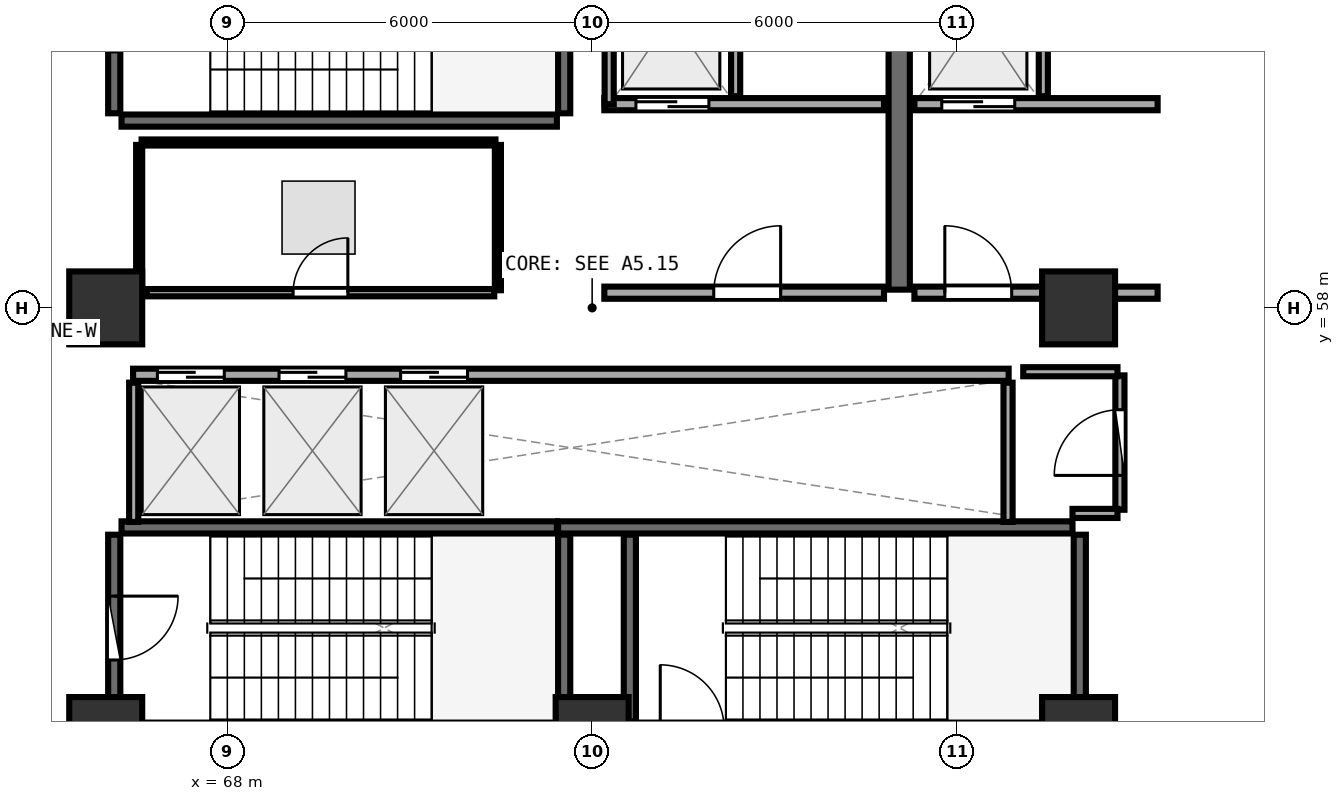
"""IFC4 building model, lengths in metres.
Left out: names, types, materials, properties, quantities, classifications, styles, units other than length and angle.
Written with IfcOpenShell. Run it as: python <this file> out.ifc"""

import sys

from ifc_helpers import new_model, si_unit, direction, frame, frame_2d, origin, origin_2d, place, context, subcontext, project, spatial, rectangle, extrude, element, fill, save


model = new_model("IFC4")
c1 = context("Model", 3, precision=1e-05, world=origin(), true_north=direction((0.0, 1.0)))
c2 = subcontext(c1, "Body", "Model", "MODEL_VIEW")
j1 = project(units=[si_unit("LENGTHUNIT", "METRE"), si_unit("PLANEANGLEUNIT", "RADIAN")], contexts=[c1])
p1 = place(None, origin())
s1 = spatial("IfcSite", under=j1, at=p1, CompositionType="ELEMENT")
p2 = place(p1, origin())
s2 = spatial("IfcBuilding", under=s1, at=p2, CompositionType="ELEMENT")
p3 = place(p2, frame((0.0, 0.0, 184.35)))
s3 = spatial("IfcBuildingStorey", under=s2, at=p3, CompositionType="ELEMENT", Elevation=184.35)
for number, where, z_axis, x_axis in (
    (1, (66.0, 51.0, 0.0), (0.0, 0.0, 1.0), (1.0, 0.0, 0.0)),
    (2, (74.0, 51.0, 0.0), (0.0, 0.0, 1.0), (1.0, 0.0, 0.0)),
    (3, (82.0, 51.0, 0.0), (0.0, 0.0, 1.0), (1.0, 0.0, 0.0)),
    (4, (82.0, 58.0, 0.0), (0.0, 0.0, 1.0), (1.0, 0.0, 0.0)),
    (5, (66.0, 58.0, 0.0), (0.0, 0.0, 1.0), (1.0, 0.0, 0.0)),
):
    element("IfcColumn", number, at=place(p3, frame(where, z_axis=z_axis, x_axis=x_axis)), inside=s3, PredefinedType="PILASTER", context=c2, shape_type="SweptSolid", body=[
        extrude(rectangle(XDim=1.2, YDim=1.2, at=origin_2d()), origin(), (0.0, 0.0, 1.0), 4.76),
    ])
p4 = place(p3, frame((66.26, 61.08, 0.0), z_axis=(0.0, 0.0, 1.0), x_axis=(1.0, 0.0, 0.0)))
e6 = element("IfcWall", 6, at=p4, inside=s3, PredefinedType="SHEAR", context=c2, shape_type="SweptSolid", body=[
    extrude(rectangle(XDim=7.16, YDim=0.2, at=frame_2d((3.58, 0.0))), origin(), (0.0, 0.0, 1.0), 4.36),
])
p5 = place(p3, frame((73.54, 61.2, 0.0), z_axis=(0.0, 0.0, 1.0), x_axis=(0.0, 1.0, 0.0)))
e7 = element("IfcWall", 7, at=p5, inside=s3, PredefinedType="SHEAR", context=c2, shape_type="SweptSolid", body=[
    extrude(rectangle(XDim=3.07, YDim=0.2, at=frame_2d((1.535, 0.0))), origin(), (0.0, 0.0, 1.0), 4.36),
])
p6 = place(p3, frame((66.14, 64.27, 0.0), z_axis=(0.0, 0.0, 1.0), x_axis=(0.0, -1.0, 0.0)))
e8 = element("IfcWall", 8, at=p6, inside=s3, PredefinedType="SHEAR", context=c2, shape_type="SweptSolid", body=[
    extrude(rectangle(XDim=3.07, YDim=0.2, at=frame_2d((1.535, 0.0))), origin(), (0.0, 0.0, 1.0), 4.36),
])
p7 = place(p6, frame((1.01, 0.0, 0.0)))
e9 = element("IfcOpeningElement", 9, at=p7, cuts=e8, PredefinedType="OPENING", context=c2, shape_type="SweptSolid", body=[
    extrude(rectangle(XDim=1.05, YDim=2.1, at=frame_2d((0.525, 1.05))), frame((0.0, 0.11, 0.0), z_axis=(0.0, -1.0, 0.0), x_axis=(1.0, 0.0, 0.0)), (0.0, 0.0, 1.0), 0.22),
])
p8 = place(p3, frame((82.02, 51.2, 0.0), z_axis=(0.0, 0.0, 1.0), x_axis=(0.0, 1.0, 0.0)))
e10 = element("IfcWall", 10, at=p8, inside=s3, PredefinedType="SHEAR", context=c2, shape_type="SweptSolid", body=[
    extrude(rectangle(XDim=3.07, YDim=0.2, at=frame_2d((1.535, 0.0))), origin(), (0.0, 0.0, 1.0), 4.36),
])
p9 = place(p3, frame((81.9, 54.39, 0.0), z_axis=(0.0, 0.0, 1.0), x_axis=(-1.0, 0.0, 0.0)))
e11 = element("IfcWall", 11, at=p9, inside=s3, PredefinedType="SHEAR", context=c2, shape_type="SweptSolid", body=[
    extrude(rectangle(XDim=8.46, YDim=0.2, at=frame_2d((4.23, 0.0))), origin(), (0.0, 0.0, 1.0), 4.36),
])
for number, where, z_axis, x_axis in (
    (12, (74.62, 54.27, 0.0), (0.0, 0.0, 1.0), (0.0, -1.0, 0.0)),
    (13, (73.54, 51.2, 0.0), (0.0, 0.0, 1.0), (0.0, 1.0, 0.0)),
):
    element("IfcWall", number, at=place(p3, frame(where, z_axis=z_axis, x_axis=x_axis)), inside=s3, PredefinedType="SHEAR", context=c2, shape_type="SweptSolid", body=[
        extrude(rectangle(XDim=3.07, YDim=0.2, at=frame_2d((1.535, 0.0))), origin(), (0.0, 0.0, 1.0), 4.36),
    ])
p10 = place(p3, frame((73.42, 54.39, 0.0), z_axis=(0.0, 0.0, 1.0), x_axis=(-1.0, 0.0, 0.0)))
e14 = element("IfcWall", 14, at=p10, inside=s3, PredefinedType="SHEAR", context=c2, shape_type="SweptSolid", body=[
    extrude(rectangle(XDim=7.16, YDim=0.2, at=frame_2d((3.58, 0.0))), origin(), (0.0, 0.0, 1.0), 4.36),
])
p11 = place(p3, frame((66.14, 54.27, 0.0), z_axis=(0.0, 0.0, 1.0), x_axis=(0.0, -1.0, 0.0)))
e15 = element("IfcWall", 15, at=p11, inside=s3, PredefinedType="SHEAR", context=c2, shape_type="SweptSolid", body=[
    extrude(rectangle(XDim=3.07, YDim=0.2, at=frame_2d((1.535, 0.0))), origin(), (0.0, 0.0, 1.0), 4.36),
])
p12 = place(p11, frame((1.01, 0.0, 0.0)))
e16 = element("IfcOpeningElement", 16, at=p12, cuts=e15, PredefinedType="OPENING", context=c2, shape_type="SweptSolid", body=[
    extrude(rectangle(XDim=1.05, YDim=2.1, at=frame_2d((0.525, 1.05))), frame((0.0, 0.11, 0.0), z_axis=(0.0, -1.0, 0.0), x_axis=(1.0, 0.0, 0.0)), (0.0, 0.0, 1.0), 0.22),
])
p13 = place(p3, frame((79.05, 58.3, 0.0), z_axis=(0.0, 0.0, 1.0), x_axis=(0.0, 1.0, 0.0)))
e17 = element("IfcWall", 17, at=p13, inside=s3, PredefinedType="SHEAR", context=c2, shape_type="SweptSolid", body=[
    extrude(rectangle(XDim=6.3, YDim=0.35, at=frame_2d((3.15, 0.0))), origin(), (0.0, 0.0, 1.0), 4.36),
])
p14 = place(p3, frame((74.2, 61.35, 0.0), z_axis=(0.0, 0.0, 1.0), x_axis=(1.0, 0.0, 0.0)))
e18 = element("IfcWall", 18, at=p14, inside=s3, PredefinedType="SOLIDWALL", context=c2, shape_type="SweptSolid", body=[
    extrude(rectangle(XDim=4.6, YDim=0.2, at=frame_2d((2.3, 0.0))), origin(), (0.0, 0.0, 1.0), 4.35),
])
p15 = place(p14, frame((0.52, 0.0, 0.0)))
e19 = element("IfcOpeningElement", 19, at=p15, cuts=e18, PredefinedType="OPENING", context=c2, shape_type="SweptSolid", body=[
    extrude(rectangle(XDim=1.2, YDim=2.15, at=frame_2d((0.6, 1.075))), frame((0.0, 0.11, 0.0), z_axis=(0.0, -1.0, 0.0), x_axis=(1.0, 0.0, 0.0)), (0.0, 0.0, 1.0), 0.22),
])
p16 = place(p3, frame((74.28, 61.35, 0.0), z_axis=(0.0, 0.0, 1.0), x_axis=(0.0, 1.0, 0.0)))
e20 = element("IfcWall", 20, at=p16, inside=s3, PredefinedType="PARTITIONING", context=c2, shape_type="SweptSolid", body=[
    extrude(rectangle(XDim=2.97, YDim=0.15, at=frame_2d((1.485, 0.0))), origin(), (0.0, 0.0, 1.0), 4.35),
])
p17 = place(p3, frame((76.36, 61.48, 0.0), z_axis=(0.0, 0.0, 1.0), x_axis=(0.0, 1.0, 0.0)))
e21 = element("IfcWall", 21, at=p17, inside=s3, PredefinedType="PARTITIONING", context=c2, shape_type="SweptSolid", body=[
    extrude(rectangle(XDim=2.84, YDim=0.15, at=frame_2d((1.42, 0.0))), origin(), (0.0, 0.0, 1.0), 4.35),
])
p18 = place(p3, frame((79.3, 61.35, 0.0), z_axis=(0.0, 0.0, 1.0), x_axis=(1.0, 0.0, 0.0)))
e22 = element("IfcWall", 22, at=p18, inside=s3, PredefinedType="SOLIDWALL", context=c2, shape_type="SweptSolid", body=[
    extrude(rectangle(XDim=4.0, YDim=0.2, at=frame_2d((2.0, 0.0))), origin(), (0.0, 0.0, 1.0), 3.645),
])
p19 = place(p18, frame((0.45, 0.0, 0.0)))
e23 = element("IfcOpeningElement", 23, at=p19, cuts=e22, PredefinedType="OPENING", context=c2, shape_type="SweptSolid", body=[
    extrude(rectangle(XDim=1.2, YDim=2.15, at=frame_2d((0.6, 1.075))), frame((0.0, 0.11, 0.0), z_axis=(0.0, -1.0, 0.0), x_axis=(1.0, 0.0, 0.0)), (0.0, 0.0, 1.0), 0.22),
])
p20 = place(p3, frame((81.42, 61.48, 0.0), z_axis=(0.0, 0.0, 1.0), x_axis=(0.0, 1.0, 0.0)))
e24 = element("IfcWall", 24, at=p20, inside=s3, PredefinedType="PARTITIONING", context=c2, shape_type="SweptSolid", body=[
    extrude(rectangle(XDim=2.84, YDim=0.15, at=frame_2d((1.42, 0.0))), origin(), (0.0, 0.0, 1.0), 4.35),
])
p21 = place(p3, frame((74.2, 58.25, 0.0), z_axis=(0.0, 0.0, 1.0), x_axis=(1.0, 0.0, 0.0)))
e25 = element("IfcWall", 25, at=p21, inside=s3, PredefinedType="SOLIDWALL", context=c2, shape_type="SweptSolid", body=[
    extrude(rectangle(XDim=4.6, YDim=0.2, at=frame_2d((2.3, 0.0))), origin(), (0.0, 0.0, 1.0), 4.35),
])
p22 = place(p21, frame((1.8, 0.0, 0.0)))
e26 = element("IfcOpeningElement", 26, at=p22, cuts=e25, PredefinedType="OPENING", context=c2, shape_type="SweptSolid", body=[
    extrude(rectangle(XDim=1.1, YDim=2.1, at=frame_2d((0.55, 1.05))), frame((0.0, 0.11, 0.0), z_axis=(0.0, -1.0, 0.0), x_axis=(1.0, 0.0, 0.0)), (0.0, 0.0, 1.0), 0.22),
])
p23 = place(p3, frame((79.3, 58.25, 0.0), z_axis=(0.0, 0.0, 1.0), x_axis=(1.0, 0.0, 0.0)))
e27 = element("IfcWall", 27, at=p23, inside=s3, PredefinedType="SOLIDWALL", context=c2, shape_type="SweptSolid", body=[
    extrude(rectangle(XDim=4.0, YDim=0.2, at=frame_2d((2.0, 0.0))), origin(), (0.0, 0.0, 1.0), 2.345),
])
p24 = place(p23, frame((0.5, 0.0, 0.0)))
e28 = element("IfcOpeningElement", 28, at=p24, cuts=e27, PredefinedType="OPENING", context=c2, shape_type="SweptSolid", body=[
    extrude(rectangle(XDim=1.1, YDim=2.1, at=frame_2d((0.55, 1.05))), frame((0.0, 0.11, 0.0), z_axis=(0.0, -1.0, 0.0), x_axis=(1.0, 0.0, 0.0)), (0.0, 0.0, 1.0), 0.22),
])
p25 = place(p3, frame((66.45, 56.9, 0.0), z_axis=(0.0, 0.0, 1.0), x_axis=(1.0, 0.0, 0.0)))
e29 = element("IfcWall", 29, at=p25, inside=s3, PredefinedType="SOLIDWALL", context=c2, shape_type="SweptSolid", body=[
    extrude(rectangle(XDim=14.4, YDim=0.2, at=frame_2d((7.2, 0.0))), origin(), (0.0, 0.0, 1.0), 4.35),
])
p26 = place(p25, frame((0.4, 0.0, 0.0)))
e30 = element("IfcOpeningElement", 30, at=p26, cuts=e29, PredefinedType="OPENING", context=c2, shape_type="SweptSolid", body=[
    extrude(rectangle(XDim=1.1, YDim=2.1, at=frame_2d((0.55, 1.05))), frame((0.0, 0.11, 0.0), z_axis=(0.0, -1.0, 0.0), x_axis=(1.0, 0.0, 0.0)), (0.0, 0.0, 1.0), 0.22),
])
p27 = place(p25, frame((2.4, 0.0, 0.0)))
e31 = element("IfcOpeningElement", 31, at=p27, cuts=e29, PredefinedType="OPENING", context=c2, shape_type="SweptSolid", body=[
    extrude(rectangle(XDim=1.1, YDim=2.1, at=frame_2d((0.55, 1.05))), frame((0.0, 0.11, 0.0), z_axis=(0.0, -1.0, 0.0), x_axis=(1.0, 0.0, 0.0)), (0.0, 0.0, 1.0), 0.22),
])
p28 = place(p25, frame((4.4, 0.0, 0.0)))
e32 = element("IfcOpeningElement", 32, at=p28, cuts=e29, PredefinedType="OPENING", context=c2, shape_type="SweptSolid", body=[
    extrude(rectangle(XDim=1.1, YDim=2.1, at=frame_2d((0.55, 1.05))), frame((0.0, 0.11, 0.0), z_axis=(0.0, -1.0, 0.0), x_axis=(1.0, 0.0, 0.0)), (0.0, 0.0, 1.0), 0.22),
])
for number, where, z_axis, x_axis in (
    (33, (66.46, 54.48, 0.0), (0.0, 0.0, 1.0), (0.0, 1.0, 0.0)),
    (34, (80.84, 54.48, 0.0), (0.0, 0.0, 1.0), (0.0, 1.0, 0.0)),
):
    element("IfcWall", number, at=place(p3, frame(where, z_axis=z_axis, x_axis=x_axis)), inside=s3, PredefinedType="PARTITIONING", context=c2, shape_type="SweptSolid", body=[
        extrude(rectangle(XDim=2.29, YDim=0.15, at=frame_2d((1.145, 0.0))), origin(), (0.0, 0.0, 1.0), 4.35),
    ])
p29 = place(p3, frame((82.68, 54.68, 0.0), z_axis=(0.0, 0.0, 1.0), x_axis=(0.0, 1.0, 0.0)))
e35 = element("IfcWall", 35, at=p29, inside=s3, PredefinedType="PARTITIONING", context=c2, shape_type="SweptSolid", body=[
    extrude(rectangle(XDim=2.21, YDim=0.15, at=frame_2d((1.105, 0.0))), origin(), (0.0, 0.0, 1.0), 4.35),
])
p30 = place(p29, frame((0.565, 0.0, 0.0)))
e36 = element("IfcOpeningElement", 36, at=p30, cuts=e35, PredefinedType="OPENING", context=c2, shape_type="SweptSolid", body=[
    extrude(rectangle(XDim=1.08, YDim=2.1, at=frame_2d((0.54, 1.05))), frame((0.0, 0.085, 0.0), z_axis=(0.0, -1.0, 0.0), x_axis=(1.0, 0.0, 0.0)), (0.0, 0.0, 1.0), 0.17),
])
p31 = place(p3, frame((66.675, 58.25, 0.0), z_axis=(0.0, 0.0, 1.0), x_axis=(1.0, 0.0, 0.0)))
e37 = element("IfcWall", 37, at=p31, inside=s3, PredefinedType="PARTITIONING", context=c2, shape_type="SweptSolid", body=[
    extrude(rectangle(XDim=5.715, YDim=0.12, at=frame_2d((2.857, 0.0))), origin(), (0.0, 0.0, 1.0), 4.35),
])
p32 = place(p31, frame((2.407, 0.0, 0.0)))
e38 = element("IfcOpeningElement", 38, at=p32, cuts=e37, PredefinedType="OPENING", context=c2, shape_type="SweptSolid", body=[
    extrude(rectangle(XDim=0.9, YDim=2.08, at=frame_2d((0.45, 1.04))), frame((0.0, 0.07, 0.0), z_axis=(0.0, -1.0, 0.0), x_axis=(1.0, 0.0, 0.0)), (0.0, 0.0, 1.0), 0.14),
])
p33 = place(p3, frame((81.9, 54.62, 0.0), z_axis=(0.0, 0.0, 1.0), x_axis=(1.0, 0.0, 0.0)))
e39 = element("IfcWall", 39, at=p33, inside=s3, PredefinedType="PARTITIONING", context=c2, shape_type="SweptSolid", body=[
    extrude(rectangle(XDim=0.74, YDim=0.15, at=frame_2d((0.37, 0.0))), origin(), (0.0, 0.0, 1.0), 3.645),
])
p34 = place(p3, frame((82.64, 56.95, 0.0), z_axis=(0.0, 0.0, 1.0), x_axis=(-1.0, 0.0, 0.0)))
e40 = element("IfcWall", 40, at=p34, inside=s3, PredefinedType="PARTITIONING", context=c2, shape_type="SweptSolid", body=[
    extrude(rectangle(XDim=1.55, YDim=0.15, at=frame_2d((0.775, 0.0))), origin(), (0.0, 0.0, 1.0), 3.645),
])
p35 = place(p3, frame((72.45, 58.29, 0.0), z_axis=(0.0, 0.0, 1.0), x_axis=(0.0, 1.0, 0.0)))
e41 = element("IfcWall", 41, at=p35, inside=s3, PredefinedType="PARTITIONING", context=c2, shape_type="SweptSolid", body=[
    extrude(rectangle(XDim=2.39, YDim=0.1, at=frame_2d((1.195, 0.0))), origin(), (0.0, 0.0, 1.0), 4.35),
])
p36 = place(p3, frame((72.41, 60.72, 0.0), z_axis=(0.0, 0.0, 1.0), x_axis=(-1.0, 0.0, 0.0)))
e42 = element("IfcWall", 42, at=p36, inside=s3, PredefinedType="PARTITIONING", context=c2, shape_type="SweptSolid", body=[
    extrude(rectangle(XDim=5.82, YDim=0.1, at=frame_2d((2.91, 0.0))), origin(), (0.0, 0.0, 1.0), 4.35),
])
p37 = place(p3, frame((66.55, 60.68, 0.0), z_axis=(0.0, 0.0, 1.0), x_axis=(0.0, -1.0, 0.0)))
e43 = element("IfcWall", 43, at=p37, inside=s3, PredefinedType="PARTITIONING", context=c2, shape_type="SweptSolid", body=[
    extrude(rectangle(XDim=2.383, YDim=0.1, at=frame_2d((1.191, 0.0))), origin(), (0.0, 0.0, 1.0), 4.35),
])
p38 = place(p3, frame((84.293, 49.708, 0.0), z_axis=(0.0, 0.0, 1.0), x_axis=(0.566732833033, 0.823901630028, 0.0)))
e44 = element("IfcWall", 44, at=p38, inside=s3, PredefinedType="PARTITIONING", context=c2, shape_type="SweptSolid", body=[
    extrude(rectangle(XDim=4.52, YDim=0.1, at=frame_2d((2.26, 0.0))), origin(), (0.0, 0.0, 1.0), 2.345),
])
p39 = place(p3, frame((87.455, 60.83, 0.0), z_axis=(0.0, 0.0, 1.0), x_axis=(-0.532779908113, 0.846253844606, 0.0)))
e45 = element("IfcWall", 45, at=p39, inside=s3, PredefinedType="PARTITIONING", context=c2, shape_type="SweptSolid", body=[
    extrude(rectangle(XDim=7.182, YDim=0.1, at=frame_2d((3.591, 0.0))), origin(), (0.0, 0.0, 1.0), 2.345),
])
p40 = place(p12, origin())
e46 = element("IfcDoor", 46, at=p40, inside=s3, OperationType="SINGLE_SWING_LEFT", PredefinedType="DOOR", context=c2, shape_type="SweptSolid", body=[
    extrude(rectangle(XDim=1.05, YDim=2.1, at=frame_2d((0.525, 1.05))), frame((0.0, 0.025, 0.0), z_axis=(0.0, -1.0, 0.0), x_axis=(1.0, 0.0, 0.0)), (0.0, 0.0, 1.0), 0.05),
])
fill(e16, e46)
p41 = place(p15, origin())
e47 = element("IfcDoor", 47, at=p41, inside=s3, OperationType="DOUBLE_DOOR_SLIDING", PredefinedType="DOOR", context=c2, shape_type="SweptSolid", body=[
    extrude(rectangle(XDim=1.2, YDim=2.15, at=frame_2d((0.6, 1.075))), frame((0.0, 0.025, 0.0), z_axis=(0.0, -1.0, 0.0), x_axis=(1.0, 0.0, 0.0)), (0.0, 0.0, 1.0), 0.05),
])
fill(e19, e47)
p42 = place(p19, origin())
e48 = element("IfcDoor", 48, at=p42, inside=s3, OperationType="DOUBLE_DOOR_SLIDING", PredefinedType="DOOR", context=c2, shape_type="SweptSolid", body=[
    extrude(rectangle(XDim=1.2, YDim=2.15, at=frame_2d((0.6, 1.075))), frame((0.0, 0.025, 0.0), z_axis=(0.0, -1.0, 0.0), x_axis=(1.0, 0.0, 0.0)), (0.0, 0.0, 1.0), 0.05),
])
fill(e23, e48)
p43 = place(p22, frame((1.1, 0.0, 0.0), z_axis=(0.0, 0.0, 1.0), x_axis=(-1.0, 0.0, 0.0)))
e49 = element("IfcDoor", 49, at=p43, inside=s3, OperationType="SINGLE_SWING_LEFT", PredefinedType="DOOR", context=c2, shape_type="SweptSolid", body=[
    extrude(rectangle(XDim=1.1, YDim=2.1, at=frame_2d((0.55, 1.05))), frame((0.0, 0.025, 0.0), z_axis=(0.0, -1.0, 0.0), x_axis=(1.0, 0.0, 0.0)), (0.0, 0.0, 1.0), 0.05),
])
fill(e26, e49)
p44 = place(p24, frame((1.1, 0.0, 0.0), z_axis=(0.0, 0.0, 1.0), x_axis=(-1.0, 0.0, 0.0)))
e50 = element("IfcDoor", 50, at=p44, inside=s3, OperationType="SINGLE_SWING_RIGHT", PredefinedType="DOOR", context=c2, shape_type="SweptSolid", body=[
    extrude(rectangle(XDim=1.1, YDim=2.1, at=frame_2d((0.55, 1.05))), frame((0.0, 0.025, 0.0), z_axis=(0.0, -1.0, 0.0), x_axis=(1.0, 0.0, 0.0)), (0.0, 0.0, 1.0), 0.05),
])
fill(e28, e50)
p45 = place(p26, origin())
e51 = element("IfcDoor", 51, at=p45, inside=s3, OperationType="DOUBLE_DOOR_SLIDING", PredefinedType="DOOR", context=c2, shape_type="SweptSolid", body=[
    extrude(rectangle(XDim=1.1, YDim=2.1, at=frame_2d((0.55, 1.05))), frame((0.0, 0.025, 0.0), z_axis=(0.0, -1.0, 0.0), x_axis=(1.0, 0.0, 0.0)), (0.0, 0.0, 1.0), 0.05),
])
fill(e30, e51)
p46 = place(p27, origin())
e52 = element("IfcDoor", 52, at=p46, inside=s3, OperationType="DOUBLE_DOOR_SLIDING", PredefinedType="DOOR", context=c2, shape_type="SweptSolid", body=[
    extrude(rectangle(XDim=1.1, YDim=2.1, at=frame_2d((0.55, 1.05))), frame((0.0, 0.025, 0.0), z_axis=(0.0, -1.0, 0.0), x_axis=(1.0, 0.0, 0.0)), (0.0, 0.0, 1.0), 0.05),
])
fill(e31, e52)
p47 = place(p28, origin())
e53 = element("IfcDoor", 53, at=p47, inside=s3, OperationType="DOUBLE_DOOR_SLIDING", PredefinedType="DOOR", context=c2, shape_type="SweptSolid", body=[
    extrude(rectangle(XDim=1.1, YDim=2.1, at=frame_2d((0.55, 1.05))), frame((0.0, 0.025, 0.0), z_axis=(0.0, -1.0, 0.0), x_axis=(1.0, 0.0, 0.0)), (0.0, 0.0, 1.0), 0.05),
])
fill(e32, e53)
p48 = place(p30, origin())
e54 = element("IfcDoor", 54, at=p48, inside=s3, OperationType="SINGLE_SWING_LEFT", PredefinedType="DOOR", context=c2, shape_type="SweptSolid", body=[
    extrude(rectangle(XDim=1.08, YDim=2.1, at=frame_2d((0.54, 1.05))), frame((0.0, 0.025, 0.0), z_axis=(0.0, -1.0, 0.0), x_axis=(1.0, 0.0, 0.0)), (0.0, 0.0, 1.0), 0.05),
])
fill(e36, e54)
p49 = place(p32, origin())
e55 = element("IfcDoor", 55, at=p49, inside=s3, OperationType="SINGLE_SWING_RIGHT", PredefinedType="DOOR", context=c2, shape_type="SweptSolid", body=[
    extrude(rectangle(XDim=0.9, YDim=2.08, at=frame_2d((0.45, 1.04))), frame((0.0, 0.025, 0.0), z_axis=(0.0, -1.0, 0.0), x_axis=(1.0, 0.0, 0.0)), (0.0, 0.0, 1.0), 0.05),
])
fill(e38, e55)
save(model, sys.argv[1])
